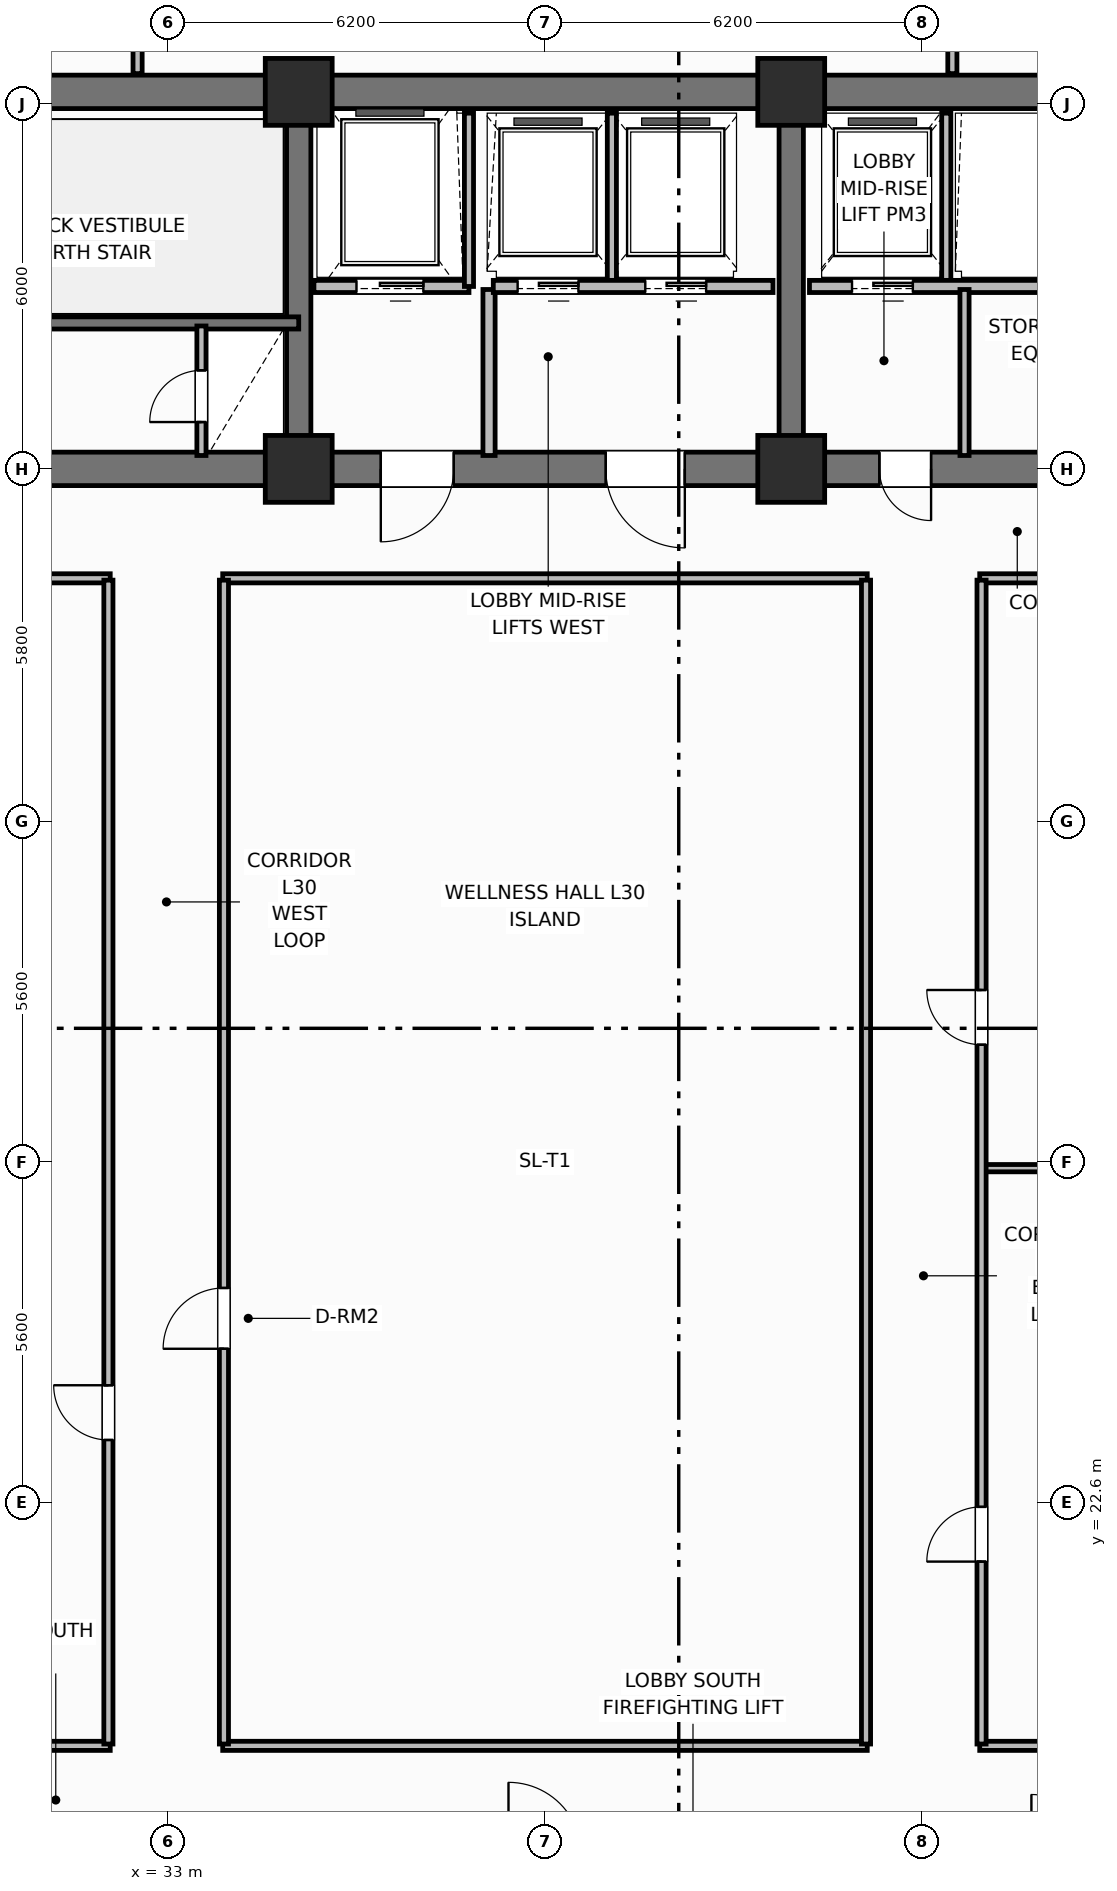
"""IFC4 building model, lengths in metres.
Left out: names, types, materials, properties, quantities, classifications, styles, units other than length and angle.
Written with IfcOpenShell. Run it as: python <this file> out.ifc"""

import sys

from ifc_helpers import new_model, si_unit, direction, frame, frame_2d, origin, origin_2d, place, context, subcontext, project, spatial, rectangle, extrude, element, fill, save


model = new_model("IFC4")
c1 = context("Model", 3, precision=1e-05, world=origin(), true_north=direction((0.0, 1.0)))
c2 = subcontext(c1, "Body", "Model", "MODEL_VIEW")
j1 = project(units=[si_unit("LENGTHUNIT", "METRE"), si_unit("PLANEANGLEUNIT", "RADIAN")], contexts=[c1])
p1 = place(None, origin())
s1 = spatial("IfcSite", under=j1, at=p1, CompositionType="ELEMENT")
p2 = place(p1, origin())
s2 = spatial("IfcBuilding", under=s1, at=p2, CompositionType="ELEMENT")
p3 = place(p2, frame((0.0, 0.0, 121.6)))
s3 = spatial("IfcBuildingStorey", under=s2, at=p3, CompositionType="ELEMENT", Elevation=121.6)
p4 = place(p3, frame((25.6, 45.8, 0.0), z_axis=(0.0, 0.0, 1.0), x_axis=(1.0, 0.0, 0.0)))
e1 = element("IfcWall", 1, at=p4, inside=s3, PredefinedType="SHEAR", context=c2, shape_type="SweptSolid", body=[
    extrude(rectangle(XDim=27.2, YDim=0.55, at=frame_2d((13.6, 0.0))), origin(), (0.0, 0.0, 1.0), 3.7),
])
p5 = place(p3, frame((52.8, 39.6, 0.0), z_axis=(0.0, 0.0, 1.0), x_axis=(-1.0, 0.0, 0.0)))
e2 = element("IfcWall", 2, at=p5, inside=s3, PredefinedType="SHEAR", context=c2, shape_type="SweptSolid", body=[
    extrude(rectangle(XDim=27.2, YDim=0.55, at=frame_2d((13.6, 0.0))), origin(), (0.0, 0.0, 1.0), 3.7),
])
p6 = place(p5, frame((24.2, 0.0, 0.0)))
e3 = element("IfcOpeningElement", 3, at=p6, cuts=e2, PredefinedType="OPENING", context=c2, shape_type="SweptSolid", body=[
    extrude(rectangle(XDim=1.1, YDim=2.15, at=frame_2d((0.55, 1.075))), frame((0.0, 0.285, 0.0), z_axis=(0.0, -1.0, 0.0), x_axis=(1.0, 0.0, 0.0)), (0.0, 0.0, 1.0), 0.57),
])
p7 = place(p5, frame((15.1, 0.0, 0.0)))
e4 = element("IfcOpeningElement", 4, at=p7, cuts=e2, PredefinedType="OPENING", context=c2, shape_type="SweptSolid", body=[
    extrude(rectangle(XDim=1.2, YDim=2.15, at=frame_2d((0.6, 1.075))), frame((0.0, 0.285, 0.0), z_axis=(0.0, -1.0, 0.0), x_axis=(1.0, 0.0, 0.0)), (0.0, 0.0, 1.0), 0.57),
])
p8 = place(p5, frame((11.3, 0.0, 0.0)))
e5 = element("IfcOpeningElement", 5, at=p8, cuts=e2, PredefinedType="OPENING", context=c2, shape_type="SweptSolid", body=[
    extrude(rectangle(XDim=1.3, YDim=2.2, at=frame_2d((0.65, 1.1))), frame((0.0, 0.285, 0.0), z_axis=(0.0, -1.0, 0.0), x_axis=(1.0, 0.0, 0.0)), (0.0, 0.0, 1.0), 0.57),
])
p9 = place(p5, frame((7.25, 0.0, 0.0)))
e6 = element("IfcOpeningElement", 6, at=p9, cuts=e2, PredefinedType="OPENING", context=c2, shape_type="SweptSolid", body=[
    extrude(rectangle(XDim=0.85, YDim=2.1, at=frame_2d((0.425, 1.05))), frame((0.0, 0.285, 0.0), z_axis=(0.0, -1.0, 0.0), x_axis=(1.0, 0.0, 0.0)), (0.0, 0.0, 1.0), 0.57),
])
p10 = place(p5, frame((3.0, 0.0, 0.0)))
e7 = element("IfcOpeningElement", 7, at=p10, cuts=e2, PredefinedType="OPENING", context=c2, shape_type="SweptSolid", body=[
    extrude(rectangle(XDim=0.9, YDim=2.1, at=frame_2d((0.45, 1.05))), frame((0.0, 0.285, 0.0), z_axis=(0.0, -1.0, 0.0), x_axis=(1.0, 0.0, 0.0)), (0.0, 0.0, 1.0), 0.57),
])
for number, where, z_axis, x_axis in (
    (8, (35.15, 39.875, 0.0), (0.0, 0.0, 1.0), (0.0, 1.0, 0.0)),
    (9, (43.25, 39.875, 0.0), (0.0, 0.0, 1.0), (0.0, 1.0, 0.0)),
):
    element("IfcWall", number, at=place(p3, frame(where, z_axis=z_axis, x_axis=x_axis)), inside=s3, PredefinedType="SHEAR", context=c2, shape_type="SweptSolid", body=[
        extrude(rectangle(XDim=5.65, YDim=0.4, at=frame_2d((2.825, 0.0))), origin(), (0.0, 0.0, 1.0), 3.7),
    ])
for number, where, z_axis, x_axis in (
    (10, (35.15, 39.6, 0.0), (0.0, 0.0, 1.0), (1.0, 0.0, 0.0)),
    (11, (35.15, 45.8, 0.0), (0.0, 0.0, 1.0), (1.0, 0.0, 0.0)),
    (12, (43.25, 39.6, 0.0), (0.0, 0.0, 1.0), (1.0, 0.0, 0.0)),
    (13, (43.25, 45.8, 0.0), (0.0, 0.0, 1.0), (1.0, 0.0, 0.0)),
):
    element("IfcColumn", number, at=place(p3, frame(where, z_axis=z_axis, x_axis=x_axis)), inside=s3, PredefinedType="COLUMN", context=c2, shape_type="SweptSolid", body=[
        extrude(rectangle(XDim=1.1, YDim=1.1, at=origin_2d()), origin(), (0.0, 0.0, 1.0), 3.7),
    ])
p11 = place(p3, frame((35.15, 42.0, 0.0), z_axis=(0.0, 0.0, 1.0), x_axis=(-1.0, 0.0, 0.0)))
e14 = element("IfcWall", 14, at=p11, inside=s3, PredefinedType="SHEAR", context=c2, shape_type="SweptSolid", body=[
    extrude(rectangle(XDim=9.55, YDim=0.2, at=frame_2d((4.775, 0.0))), origin(), (0.0, 0.0, 1.0), 3.7),
])
p12 = place(p11, frame((7.25, 0.0, 0.0)))
e15 = element("IfcOpeningElement", 15, at=p12, cuts=e14, PredefinedType="OPENING", context=c2, shape_type="SweptSolid", body=[
    extrude(rectangle(XDim=1.1, YDim=2.15, at=frame_2d((0.55, 1.075))), frame((0.0, 0.11, 0.0), z_axis=(0.0, -1.0, 0.0), x_axis=(1.0, 0.0, 0.0)), (0.0, 0.0, 1.0), 0.22),
])
p13 = place(p3, frame((33.55, 39.82, 0.0), z_axis=(0.0, 0.0, 1.0), x_axis=(0.0, 1.0, 0.0)))
e16 = element("IfcWall", 16, at=p13, inside=s3, PredefinedType="PARTITIONING", context=c2, shape_type="SweptSolid", body=[
    extrude(rectangle(XDim=2.13, YDim=0.15, at=frame_2d((1.065, 0.0))), origin(), (0.0, 0.0, 1.0), 2.53),
])
p14 = place(p13, frame((0.55, 0.0, 0.0)))
e17 = element("IfcOpeningElement", 17, at=p14, cuts=e16, PredefinedType="OPENING", context=c2, shape_type="SweptSolid", body=[
    extrude(rectangle(XDim=0.85, YDim=2.05, at=frame_2d((0.425, 1.025))), frame((0.0, 0.085, 0.0), z_axis=(0.0, -1.0, 0.0), x_axis=(1.0, 0.0, 0.0)), (0.0, 0.0, 1.0), 0.17),
])
p15 = place(p3, frame((37.95, 42.6, 0.0), z_axis=(0.0, 0.0, 1.0), x_axis=(-1.0, 0.0, 0.0)))
e18 = element("IfcWall", 18, at=p15, inside=s3, PredefinedType="PARTITIONING", context=c2, shape_type="SweptSolid", body=[
    extrude(rectangle(XDim=2.55, YDim=0.2, at=frame_2d((1.275, 0.0))), origin(), (0.0, 0.0, 1.0), 2.3),
])
p16 = place(p15, frame((0.75, 0.0, 0.0)))
e19 = element("IfcOpeningElement", 19, at=p16, cuts=e18, PredefinedType="OPENING", context=c2, shape_type="SweptSolid", body=[
    extrude(rectangle(XDim=1.1, YDim=2.15, at=frame_2d((0.55, 1.075))), frame((0.0, 0.11, 0.0), z_axis=(0.0, -1.0, 0.0), x_axis=(1.0, 0.0, 0.0)), (0.0, 0.0, 1.0), 0.22),
])
p17 = place(p3, frame((37.95, 42.6, 0.0), z_axis=(0.0, 0.0, 1.0), x_axis=(0.0, 1.0, 0.0)))
e20 = element("IfcWall", 20, at=p17, inside=s3, PredefinedType="PARTITIONING", context=c2, shape_type="SweptSolid", body=[
    extrude(rectangle(XDim=2.85, YDim=0.15, at=frame_2d((1.425, 0.0))), origin(), (0.0, 0.0, 1.0), 2.53),
])
p18 = place(p3, frame((38.28, 39.82, 0.0), z_axis=(0.0, 0.0, 1.0), x_axis=(0.0, 1.0, 0.0)))
e21 = element("IfcWall", 21, at=p18, inside=s3, PredefinedType="PARTITIONING", context=c2, shape_type="SweptSolid", body=[
    extrude(rectangle(XDim=2.73, YDim=0.2, at=frame_2d((1.365, 0.0))), origin(), (0.0, 0.0, 1.0), 2.53),
])
p19 = place(p3, frame((40.3, 42.65, 0.0), z_axis=(0.0, 0.0, 1.0), x_axis=(0.0, 1.0, 0.0)))
e22 = element("IfcWall", 22, at=p19, inside=s3, PredefinedType="PARTITIONING", context=c2, shape_type="SweptSolid", body=[
    extrude(rectangle(XDim=2.8, YDim=0.15, at=frame_2d((1.4, 0.0))), origin(), (0.0, 0.0, 1.0), 2.53),
])
p20 = place(p3, frame((42.95, 42.6, 0.0), z_axis=(0.0, 0.0, 1.0), x_axis=(-1.0, 0.0, 0.0)))
e23 = element("IfcWall", 23, at=p20, inside=s3, PredefinedType="PARTITIONING", context=c2, shape_type="SweptSolid", body=[
    extrude(rectangle(XDim=4.6, YDim=0.2, at=frame_2d((2.3, 0.0))), origin(), (0.0, 0.0, 1.0), 2.3),
])
p21 = place(p20, frame((3.2, 0.0, 0.0)))
e24 = element("IfcOpeningElement", 24, at=p21, cuts=e23, PredefinedType="OPENING", context=c2, shape_type="SweptSolid", body=[
    extrude(rectangle(XDim=1.0, YDim=2.15, at=frame_2d((0.5, 1.075))), frame((0.0, 0.11, 0.0), z_axis=(0.0, -1.0, 0.0), x_axis=(1.0, 0.0, 0.0)), (0.0, 0.0, 1.0), 0.22),
])
p22 = place(p20, frame((1.1, 0.0, 0.0)))
e25 = element("IfcOpeningElement", 25, at=p22, cuts=e23, PredefinedType="OPENING", context=c2, shape_type="SweptSolid", body=[
    extrude(rectangle(XDim=1.0, YDim=2.15, at=frame_2d((0.5, 1.075))), frame((0.0, 0.11, 0.0), z_axis=(0.0, -1.0, 0.0), x_axis=(1.0, 0.0, 0.0)), (0.0, 0.0, 1.0), 0.22),
])
p23 = place(p3, frame((45.8, 42.65, 0.0), z_axis=(0.0, 0.0, 1.0), x_axis=(0.0, 1.0, 0.0)))
e26 = element("IfcWall", 26, at=p23, inside=s3, PredefinedType="PARTITIONING", context=c2, shape_type="SweptSolid", body=[
    extrude(rectangle(XDim=2.8, YDim=0.15, at=frame_2d((1.4, 0.0))), origin(), (0.0, 0.0, 1.0), 2.53),
])
p24 = place(p3, frame((52.35, 42.6, 0.0), z_axis=(0.0, 0.0, 1.0), x_axis=(-1.0, 0.0, 0.0)))
e27 = element("IfcWall", 27, at=p24, inside=s3, PredefinedType="PARTITIONING", context=c2, shape_type="SweptSolid", body=[
    extrude(rectangle(XDim=8.8, YDim=0.2, at=frame_2d((4.4, 0.0))), origin(), (0.0, 0.0, 1.0), 2.53),
])
p25 = place(p24, frame((7.1, 0.0, 0.0)))
e28 = element("IfcOpeningElement", 28, at=p25, cuts=e27, PredefinedType="OPENING", context=c2, shape_type="SweptSolid", body=[
    extrude(rectangle(XDim=1.0, YDim=2.15, at=frame_2d((0.5, 1.075))), frame((0.0, 0.11, 0.0), z_axis=(0.0, -1.0, 0.0), x_axis=(1.0, 0.0, 0.0)), (0.0, 0.0, 1.0), 0.22),
])
p26 = place(p3, frame((46.1, 39.82, 0.0), z_axis=(0.0, 0.0, 1.0), x_axis=(0.0, 1.0, 0.0)))
e29 = element("IfcWall", 29, at=p26, inside=s3, PredefinedType="PARTITIONING", context=c2, shape_type="SweptSolid", body=[
    extrude(rectangle(XDim=2.73, YDim=0.15, at=frame_2d((1.365, 0.0))), origin(), (0.0, 0.0, 1.0), 2.53),
])
for number, where, z_axis, x_axis in (
    (30, (25.55, 18.6, 0.0), (0.0, 0.0, 1.0), (1.0, 0.0, 0.0)),
    (31, (25.55, 37.8, 0.0), (0.0, 0.0, 1.0), (1.0, 0.0, 0.0)),
):
    element("IfcWall", number, at=place(p3, frame(where, z_axis=z_axis, x_axis=x_axis)), inside=s3, PredefinedType="PARTITIONING", context=c2, shape_type="SweptSolid", body=[
        extrude(rectangle(XDim=6.5, YDim=0.15, at=frame_2d((3.25, 0.0))), origin(), (0.0, 0.0, 1.0), 2.53),
    ])
for number, where, z_axis, x_axis in (
    (32, (33.9, 18.6, 0.0), (0.0, 0.0, 1.0), (1.0, 0.0, 0.0)),
    (33, (33.9, 37.8, 0.0), (0.0, 0.0, 1.0), (1.0, 0.0, 0.0)),
):
    element("IfcWall", number, at=place(p3, frame(where, z_axis=z_axis, x_axis=x_axis)), inside=s3, PredefinedType="PARTITIONING", context=c2, shape_type="SweptSolid", body=[
        extrude(rectangle(XDim=10.6, YDim=0.15, at=frame_2d((5.3, 0.0))), origin(), (0.0, 0.0, 1.0), 2.53),
    ])
for number, where, z_axis, x_axis in (
    (34, (46.35, 18.6, 0.0), (0.0, 0.0, 1.0), (1.0, 0.0, 0.0)),
    (35, (46.35, 37.8, 0.0), (0.0, 0.0, 1.0), (1.0, 0.0, 0.0)),
):
    element("IfcWall", number, at=place(p3, frame(where, z_axis=z_axis, x_axis=x_axis)), inside=s3, PredefinedType="PARTITIONING", context=c2, shape_type="SweptSolid", body=[
        extrude(rectangle(XDim=6.5, YDim=0.15, at=frame_2d((3.25, 0.0))), origin(), (0.0, 0.0, 1.0), 2.53),
    ])
p27 = place(p3, frame((46.38, 28.1, 0.0), z_axis=(0.0, 0.0, 1.0), x_axis=(1.0, 0.0, 0.0)))
e36 = element("IfcWall", 36, at=p27, inside=s3, PredefinedType="PARTITIONING", context=c2, shape_type="SweptSolid", body=[
    extrude(rectangle(XDim=6.42, YDim=0.12, at=frame_2d((3.21, 0.0))), origin(), (0.0, 0.0, 1.0), 2.53),
])
p28 = place(p3, frame((32.02, 18.63, 0.0), z_axis=(0.0, 0.0, 1.0), x_axis=(0.0, 1.0, 0.0)))
e37 = element("IfcWall", 37, at=p28, inside=s3, PredefinedType="PARTITIONING", context=c2, shape_type="SweptSolid", body=[
    extrude(rectangle(XDim=19.14, YDim=0.15, at=frame_2d((9.57, 0.0))), origin(), (0.0, 0.0, 1.0), 2.53),
])
p29 = place(p28, frame((5.0, 0.0, 0.0)))
e38 = element("IfcOpeningElement", 38, at=p29, cuts=e37, PredefinedType="OPENING", context=c2, shape_type="SweptSolid", body=[
    extrude(rectangle(XDim=0.9, YDim=2.1, at=frame_2d((0.45, 1.05))), frame((0.0, 0.085, 0.0), z_axis=(0.0, -1.0, 0.0), x_axis=(1.0, 0.0, 0.0)), (0.0, 0.0, 1.0), 0.17),
])
p30 = place(p3, frame((33.92, 18.63, 0.0), z_axis=(0.0, 0.0, 1.0), x_axis=(0.0, 1.0, 0.0)))
e39 = element("IfcWall", 39, at=p30, inside=s3, PredefinedType="PARTITIONING", context=c2, shape_type="SweptSolid", body=[
    extrude(rectangle(XDim=19.14, YDim=0.15, at=frame_2d((9.57, 0.0))), origin(), (0.0, 0.0, 1.0), 2.53),
])
p31 = place(p30, frame((6.5, 0.0, 0.0)))
e40 = element("IfcOpeningElement", 40, at=p31, cuts=e39, PredefinedType="OPENING", context=c2, shape_type="SweptSolid", body=[
    extrude(rectangle(XDim=1.0, YDim=2.15, at=frame_2d((0.5, 1.075))), frame((0.0, 0.085, 0.0), z_axis=(0.0, -1.0, 0.0), x_axis=(1.0, 0.0, 0.0)), (0.0, 0.0, 1.0), 0.17),
])
p32 = place(p3, frame((44.48, 18.63, 0.0), z_axis=(0.0, 0.0, 1.0), x_axis=(0.0, 1.0, 0.0)))
e41 = element("IfcWall", 41, at=p32, inside=s3, PredefinedType="PARTITIONING", context=c2, shape_type="SweptSolid", body=[
    extrude(rectangle(XDim=19.14, YDim=0.15, at=frame_2d((9.57, 0.0))), origin(), (0.0, 0.0, 1.0), 2.53),
])
p33 = place(p3, frame((46.38, 18.63, 0.0), z_axis=(0.0, 0.0, 1.0), x_axis=(0.0, 1.0, 0.0)))
e42 = element("IfcWall", 42, at=p33, inside=s3, PredefinedType="PARTITIONING", context=c2, shape_type="SweptSolid", body=[
    extrude(rectangle(XDim=19.14, YDim=0.15, at=frame_2d((9.57, 0.0))), origin(), (0.0, 0.0, 1.0), 2.53),
])
p34 = place(p33, frame((3.0, 0.0, 0.0)))
e43 = element("IfcOpeningElement", 43, at=p34, cuts=e42, PredefinedType="OPENING", context=c2, shape_type="SweptSolid", body=[
    extrude(rectangle(XDim=0.9, YDim=2.1, at=frame_2d((0.45, 1.05))), frame((0.0, 0.085, 0.0), z_axis=(0.0, -1.0, 0.0), x_axis=(1.0, 0.0, 0.0)), (0.0, 0.0, 1.0), 0.17),
])
p35 = place(p33, frame((11.5, 0.0, 0.0)))
e44 = element("IfcOpeningElement", 44, at=p35, cuts=e42, PredefinedType="OPENING", context=c2, shape_type="SweptSolid", body=[
    extrude(rectangle(XDim=0.9, YDim=2.1, at=frame_2d((0.45, 1.05))), frame((0.0, 0.085, 0.0), z_axis=(0.0, -1.0, 0.0), x_axis=(1.0, 0.0, 0.0)), (0.0, 0.0, 1.0), 0.17),
])
p36 = place(p3, frame((32.5, 46.1, 0.0), z_axis=(0.0, 0.0, 1.0), x_axis=(0.0, 1.0, 0.0)))
e45 = element("IfcWall", 45, at=p36, inside=s3, PredefinedType="PARTITIONING", context=c2, shape_type="SweptSolid", body=[
    extrude(rectangle(XDim=5.33, YDim=0.15, at=frame_2d((2.665, 0.0))), origin(), (0.0, 0.0, 1.0), 2.53),
])
p37 = place(p36, frame((0.85, 0.0, 0.0)))
e46 = element("IfcOpeningElement", 46, at=p37, cuts=e45, PredefinedType="OPENING", context=c2, shape_type="SweptSolid", body=[
    extrude(rectangle(XDim=0.9, YDim=2.1, at=frame_2d((0.45, 1.05))), frame((0.0, 0.085, 0.0), z_axis=(0.0, -1.0, 0.0), x_axis=(1.0, 0.0, 0.0)), (0.0, 0.0, 1.0), 0.17),
])
p38 = place(p3, frame((45.9, 46.1, 0.0), z_axis=(0.0, 0.0, 1.0), x_axis=(0.0, 1.0, 0.0)))
e47 = element("IfcWall", 47, at=p38, inside=s3, PredefinedType="PARTITIONING", context=c2, shape_type="SweptSolid", body=[
    extrude(rectangle(XDim=5.33, YDim=0.15, at=frame_2d((2.665, 0.0))), origin(), (0.0, 0.0, 1.0), 2.53),
])
p39 = place(p14, origin())
e48 = element("IfcDoor", 48, at=p39, inside=s3, OperationType="SINGLE_SWING_LEFT", PredefinedType="TRAPDOOR", context=c2, shape_type="SweptSolid", body=[
    extrude(rectangle(XDim=0.85, YDim=2.05, at=frame_2d((0.425, 1.025))), frame((0.0, 0.025, 0.0), z_axis=(0.0, -1.0, 0.0), x_axis=(1.0, 0.0, 0.0)), (0.0, 0.0, 1.0), 0.05),
])
fill(e17, e48)
p40 = place(p16, origin())
e49 = element("IfcDoor", 49, at=p40, inside=s3, OperationType="SLIDING_TO_LEFT", PredefinedType="DOOR", context=c2, shape_type="SweptSolid", body=[
    extrude(rectangle(XDim=1.1, YDim=2.15, at=frame_2d((0.55, 1.075))), frame((0.0, 0.025, 0.0), z_axis=(0.0, -1.0, 0.0), x_axis=(1.0, 0.0, 0.0)), (0.0, 0.0, 1.0), 0.05),
])
fill(e19, e49)
p41 = place(p21, origin())
e50 = element("IfcDoor", 50, at=p41, inside=s3, OperationType="SLIDING_TO_LEFT", PredefinedType="DOOR", context=c2, shape_type="SweptSolid", body=[
    extrude(rectangle(XDim=1.0, YDim=2.15, at=frame_2d((0.5, 1.075))), frame((0.0, 0.025, 0.0), z_axis=(0.0, -1.0, 0.0), x_axis=(1.0, 0.0, 0.0)), (0.0, 0.0, 1.0), 0.05),
])
fill(e24, e50)
p42 = place(p22, origin())
e51 = element("IfcDoor", 51, at=p42, inside=s3, OperationType="SLIDING_TO_LEFT", PredefinedType="DOOR", context=c2, shape_type="SweptSolid", body=[
    extrude(rectangle(XDim=1.0, YDim=2.15, at=frame_2d((0.5, 1.075))), frame((0.0, 0.025, 0.0), z_axis=(0.0, -1.0, 0.0), x_axis=(1.0, 0.0, 0.0)), (0.0, 0.0, 1.0), 0.05),
])
fill(e25, e51)
p43 = place(p25, origin())
e52 = element("IfcDoor", 52, at=p43, inside=s3, OperationType="SLIDING_TO_LEFT", PredefinedType="DOOR", context=c2, shape_type="SweptSolid", body=[
    extrude(rectangle(XDim=1.0, YDim=2.15, at=frame_2d((0.5, 1.075))), frame((0.0, 0.025, 0.0), z_axis=(0.0, -1.0, 0.0), x_axis=(1.0, 0.0, 0.0)), (0.0, 0.0, 1.0), 0.05),
])
fill(e28, e52)
p44 = place(p29, origin())
e53 = element("IfcDoor", 53, at=p44, inside=s3, OperationType="SINGLE_SWING_RIGHT", PredefinedType="DOOR", context=c2, shape_type="SweptSolid", body=[
    extrude(rectangle(XDim=0.9, YDim=2.1, at=frame_2d((0.45, 1.05))), frame((0.0, 0.025, 0.0), z_axis=(0.0, -1.0, 0.0), x_axis=(1.0, 0.0, 0.0)), (0.0, 0.0, 1.0), 0.05),
])
fill(e38, e53)
p45 = place(p31, origin())
e54 = element("IfcDoor", 54, at=p45, inside=s3, OperationType="SINGLE_SWING_LEFT", PredefinedType="DOOR", context=c2, shape_type="SweptSolid", body=[
    extrude(rectangle(XDim=1.0, YDim=2.15, at=frame_2d((0.5, 1.075))), frame((0.0, 0.025, 0.0), z_axis=(0.0, -1.0, 0.0), x_axis=(1.0, 0.0, 0.0)), (0.0, 0.0, 1.0), 0.05),
])
fill(e40, e54)
p46 = place(p34, origin())
e55 = element("IfcDoor", 55, at=p46, inside=s3, OperationType="SINGLE_SWING_LEFT", PredefinedType="DOOR", context=c2, shape_type="SweptSolid", body=[
    extrude(rectangle(XDim=0.9, YDim=2.1, at=frame_2d((0.45, 1.05))), frame((0.0, 0.025, 0.0), z_axis=(0.0, -1.0, 0.0), x_axis=(1.0, 0.0, 0.0)), (0.0, 0.0, 1.0), 0.05),
])
fill(e43, e55)
p47 = place(p35, origin())
e56 = element("IfcDoor", 56, at=p47, inside=s3, OperationType="SINGLE_SWING_RIGHT", PredefinedType="DOOR", context=c2, shape_type="SweptSolid", body=[
    extrude(rectangle(XDim=0.9, YDim=2.1, at=frame_2d((0.45, 1.05))), frame((0.0, 0.025, 0.0), z_axis=(0.0, -1.0, 0.0), x_axis=(1.0, 0.0, 0.0)), (0.0, 0.0, 1.0), 0.05),
])
fill(e44, e56)
p48 = place(p7, origin())
e57 = element("IfcDoor", 57, at=p48, inside=s3, OperationType="SINGLE_SWING_RIGHT", PredefinedType="DOOR", context=c2, shape_type="SweptSolid", body=[
    extrude(rectangle(XDim=1.2, YDim=2.15, at=frame_2d((0.6, 1.075))), frame((0.0, 0.025, 0.0), z_axis=(0.0, -1.0, 0.0), x_axis=(1.0, 0.0, 0.0)), (0.0, 0.0, 1.0), 0.05),
])
fill(e4, e57)
p49 = place(p8, origin())
e58 = element("IfcDoor", 58, at=p49, inside=s3, OperationType="SINGLE_SWING_LEFT", PredefinedType="DOOR", context=c2, shape_type="SweptSolid", body=[
    extrude(rectangle(XDim=1.3, YDim=2.2, at=frame_2d((0.65, 1.1))), frame((0.0, 0.025, 0.0), z_axis=(0.0, -1.0, 0.0), x_axis=(1.0, 0.0, 0.0)), (0.0, 0.0, 1.0), 0.05),
])
fill(e5, e58)
p50 = place(p9, origin())
e59 = element("IfcDoor", 59, at=p50, inside=s3, OperationType="SINGLE_SWING_LEFT", PredefinedType="DOOR", context=c2, shape_type="SweptSolid", body=[
    extrude(rectangle(XDim=0.85, YDim=2.1, at=frame_2d((0.425, 1.05))), frame((0.0, 0.025, 0.0), z_axis=(0.0, -1.0, 0.0), x_axis=(1.0, 0.0, 0.0)), (0.0, 0.0, 1.0), 0.05),
])
fill(e6, e59)
save(model, sys.argv[1])
